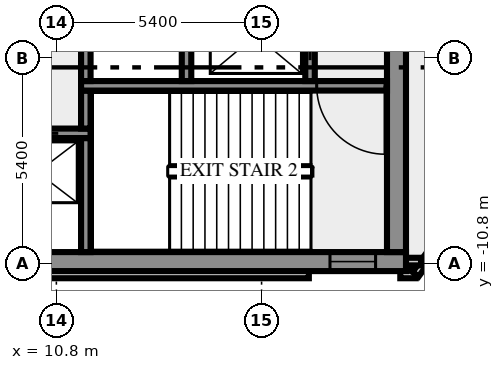
"""IFC4 building model, lengths in metres.
Left out: names, types, materials, properties, quantities, classifications, styles, units other than length and angle.
Written with IfcOpenShell. Run it as: python <this file> out.ifc"""

import sys

from ifc_helpers import new_model, si_unit, direction, frame, frame_2d, origin, place, context, subcontext, project, spatial, rectangle, extrude, element, fill, save


model = new_model("IFC4")
c1 = context("Model", 3, precision=1e-05, world=origin(), true_north=direction((0.0, 1.0)))
c2 = subcontext(c1, "Body", "Model", "MODEL_VIEW")
j1 = project(units=[si_unit("LENGTHUNIT", "METRE"), si_unit("PLANEANGLEUNIT", "RADIAN")], contexts=[c1])
p1 = place(None, origin())
s1 = spatial("IfcSite", under=j1, at=p1, CompositionType="ELEMENT")
p2 = place(p1, origin())
s2 = spatial("IfcBuilding", under=s1, at=p2, CompositionType="ELEMENT")
p3 = place(p2, frame((0.0, 0.0, 210.0)))
s3 = spatial("IfcBuildingStorey", under=s2, at=p3, CompositionType="ELEMENT", Elevation=210.0)
p4 = place(p3, frame((-17.444, -11.088, 0.0), z_axis=(0.0, 0.0, 1.0), x_axis=(1.0, 0.0, 0.0)))
e1 = element("IfcWall", 1, at=p4, inside=s3, PredefinedType="SOLIDWALL", context=c2, shape_type="SweptSolid", body=[
    extrude(rectangle(XDim=34.888, YDim=0.2, at=frame_2d((17.444, 0.0))), origin(), (0.0, 0.0, 1.0), 3.65),
])
p5 = place(p3, frame((19.85, -11.088, 0.0), z_axis=(0.0, 0.0, 1.0), x_axis=(1.0, 0.0, 0.0)))
e2 = element("IfcWall", 2, at=p5, inside=s3, PredefinedType="SOLIDWALL", context=c2, shape_type="SweptSolid", body=[
    extrude(rectangle(XDim=0.406, YDim=0.2, at=frame_2d((0.203, 0.0))), origin(), (0.0, 0.0, 1.0), 3.65),
])
p6 = place(p3, frame((20.253, -11.083, 0.0), z_axis=(0.0, 0.0, 1.0), x_axis=(0.587766567315, 0.809030569476, 0.0)))
e3 = element("IfcWall", 3, at=p6, inside=s3, PredefinedType="SOLIDWALL", context=c2, shape_type="SweptSolid", body=[
    extrude(rectangle(XDim=2.688, YDim=0.2, at=frame_2d((1.344, 0.0))), origin(), (0.0, 0.0, 1.0), 3.65),
])
p7 = place(p3, frame((19.98, -10.75, 0.0), z_axis=(0.0, 0.0, 1.0), x_axis=(1.0, 0.0, 0.0)))
e4 = element("IfcWall", 4, at=p7, inside=s3, PredefinedType="SOLIDWALL", context=c2, shape_type="SweptSolid", body=[
    extrude(rectangle(XDim=0.417, YDim=0.2, at=frame_2d((0.208, 0.0))), origin(), (0.0, 0.0, 1.0), 3.65),
])
p8 = place(p3, frame((-20.0, -10.75, 0.0), z_axis=(0.0, 0.0, 1.0), x_axis=(1.0, 0.0, 0.0)))
e5 = element("IfcWall", 5, at=p8, inside=s3, PredefinedType="SHEAR", context=c2, shape_type="SweptSolid", body=[
    extrude(rectangle(XDim=40.0, YDim=0.5, at=frame_2d((20.0, 0.0))), origin(), (0.0, 0.0, 1.0), 3.65),
])
p9 = place(p8, frame((0.8, 0.0, 1.0)))
e6 = element("IfcOpeningElement", 6, at=p9, cuts=e5, PredefinedType="OPENING", context=c2, shape_type="SweptSolid", body=[
    extrude(rectangle(XDim=1.2, YDim=1.2, at=frame_2d((0.6, 0.6))), frame((0.0, 0.26, 0.0), z_axis=(0.0, -1.0, 0.0), x_axis=(1.0, 0.0, 0.0)), (0.0, 0.0, 1.0), 0.52),
])
p10 = place(p8, frame((38.0, 0.0, 1.0)))
e7 = element("IfcOpeningElement", 7, at=p10, cuts=e5, PredefinedType="OPENING", context=c2, shape_type="SweptSolid", body=[
    extrude(rectangle(XDim=1.2, YDim=1.2, at=frame_2d((0.6, 0.6))), frame((0.0, 0.26, 0.0), z_axis=(0.0, -1.0, 0.0), x_axis=(1.0, 0.0, 0.0)), (0.0, 0.0, 1.0), 0.52),
])
p11 = place(p3, frame((11.575, -10.5, 0.0), z_axis=(0.0, 0.0, 1.0), x_axis=(0.0, 1.0, 0.0)))
e8 = element("IfcWall", 8, at=p11, inside=s3, PredefinedType="SHEAR", context=c2, shape_type="SweptSolid", body=[
    extrude(rectangle(XDim=3.0, YDim=0.25, at=frame_2d((1.5, 0.0))), origin(), (0.0, 0.0, 1.0), 3.65),
])
p12 = place(p3, frame((19.75, -10.5, 0.0), z_axis=(0.0, 0.0, 1.0), x_axis=(0.0, 1.0, 0.0)))
e9 = element("IfcWall", 9, at=p12, inside=s3, PredefinedType="SHEAR", context=c2, shape_type="SweptSolid", body=[
    extrude(rectangle(XDim=8.8, YDim=0.5, at=frame_2d((4.4, 0.0))), origin(), (0.0, 0.0, 1.0), 3.65),
])
p13 = place(p3, frame((11.7, -7.375, 0.0), z_axis=(0.0, 0.0, 1.0), x_axis=(-1.0, 0.0, 0.0)))
e10 = element("IfcWall", 10, at=p13, inside=s3, PredefinedType="SHEAR", context=c2, shape_type="SweptSolid", body=[
    extrude(rectangle(XDim=23.4, YDim=0.25, at=frame_2d((11.7, 0.0))), origin(), (0.0, 0.0, 1.0), 3.65),
])
p14 = place(p13, frame((21.312, 0.0, 0.0)))
e11 = element("IfcOpeningElement", 11, at=p14, cuts=e10, PredefinedType="OPENING", context=c2, shape_type="SweptSolid", body=[
    extrude(rectangle(XDim=0.9, YDim=2.1, at=frame_2d((0.45, 1.05))), frame((0.0, 0.135, 0.0), z_axis=(0.0, -1.0, 0.0), x_axis=(1.0, 0.0, 0.0)), (0.0, 0.0, 1.0), 0.27),
])
p15 = place(p13, frame((18.65, 0.0, 0.0)))
e12 = element("IfcOpeningElement", 12, at=p15, cuts=e10, PredefinedType="OPENING", context=c2, shape_type="SweptSolid", body=[
    extrude(rectangle(XDim=0.9, YDim=2.1, at=frame_2d((0.45, 1.05))), frame((0.0, 0.135, 0.0), z_axis=(0.0, -1.0, 0.0), x_axis=(1.0, 0.0, 0.0)), (0.0, 0.0, 1.0), 0.27),
])
p16 = place(p13, frame((16.388, 0.0, 0.0)))
e13 = element("IfcOpeningElement", 13, at=p16, cuts=e10, PredefinedType="OPENING", context=c2, shape_type="SweptSolid", body=[
    extrude(rectangle(XDim=0.9, YDim=2.1, at=frame_2d((0.45, 1.05))), frame((0.0, 0.135, 0.0), z_axis=(0.0, -1.0, 0.0), x_axis=(1.0, 0.0, 0.0)), (0.0, 0.0, 1.0), 0.27),
])
p17 = place(p13, frame((14.65, 0.0, 0.0)))
e14 = element("IfcOpeningElement", 14, at=p17, cuts=e10, PredefinedType="OPENING", context=c2, shape_type="SweptSolid", body=[
    extrude(rectangle(XDim=0.7, YDim=2.1, at=frame_2d((0.35, 1.05))), frame((0.0, 0.135, 0.0), z_axis=(0.0, -1.0, 0.0), x_axis=(1.0, 0.0, 0.0)), (0.0, 0.0, 1.0), 0.27),
])
p18 = place(p13, frame((13.35, 0.0, 0.0)))
e15 = element("IfcOpeningElement", 15, at=p18, cuts=e10, PredefinedType="OPENING", context=c2, shape_type="SweptSolid", body=[
    extrude(rectangle(XDim=0.9, YDim=2.1, at=frame_2d((0.45, 1.05))), frame((0.0, 0.135, 0.0), z_axis=(0.0, -1.0, 0.0), x_axis=(1.0, 0.0, 0.0)), (0.0, 0.0, 1.0), 0.27),
])
p19 = place(p13, frame((11.975, 0.0, 0.0)))
e16 = element("IfcOpeningElement", 16, at=p19, cuts=e10, PredefinedType="OPENING", context=c2, shape_type="SweptSolid", body=[
    extrude(rectangle(XDim=0.9, YDim=2.1, at=frame_2d((0.45, 1.05))), frame((0.0, 0.135, 0.0), z_axis=(0.0, -1.0, 0.0), x_axis=(1.0, 0.0, 0.0)), (0.0, 0.0, 1.0), 0.27),
])
p20 = place(p13, frame((10.5, 0.0, 0.0)))
e17 = element("IfcOpeningElement", 17, at=p20, cuts=e10, PredefinedType="OPENING", context=c2, shape_type="SweptSolid", body=[
    extrude(rectangle(XDim=0.9, YDim=2.1, at=frame_2d((0.45, 1.05))), frame((0.0, 0.135, 0.0), z_axis=(0.0, -1.0, 0.0), x_axis=(1.0, 0.0, 0.0)), (0.0, 0.0, 1.0), 0.27),
])
p21 = place(p13, frame((8.35, 0.0, 0.0)))
e18 = element("IfcOpeningElement", 18, at=p21, cuts=e10, PredefinedType="OPENING", context=c2, shape_type="SweptSolid", body=[
    extrude(rectangle(XDim=1.1, YDim=2.1, at=frame_2d((0.55, 1.05))), frame((0.0, 0.135, 0.0), z_axis=(0.0, -1.0, 0.0), x_axis=(1.0, 0.0, 0.0)), (0.0, 0.0, 1.0), 0.27),
])
p22 = place(p13, frame((5.85, 0.0, 0.0)))
e19 = element("IfcOpeningElement", 19, at=p22, cuts=e10, PredefinedType="OPENING", context=c2, shape_type="SweptSolid", body=[
    extrude(rectangle(XDim=1.1, YDim=2.1, at=frame_2d((0.55, 1.05))), frame((0.0, 0.135, 0.0), z_axis=(0.0, -1.0, 0.0), x_axis=(1.0, 0.0, 0.0)), (0.0, 0.0, 1.0), 0.27),
])
p23 = place(p13, frame((3.35, 0.0, 0.0)))
e20 = element("IfcOpeningElement", 20, at=p23, cuts=e10, PredefinedType="OPENING", context=c2, shape_type="SweptSolid", body=[
    extrude(rectangle(XDim=1.1, YDim=2.1, at=frame_2d((0.55, 1.05))), frame((0.0, 0.135, 0.0), z_axis=(0.0, -1.0, 0.0), x_axis=(1.0, 0.0, 0.0)), (0.0, 0.0, 1.0), 0.27),
])
p24 = place(p13, frame((0.85, 0.0, 0.0)))
e21 = element("IfcOpeningElement", 21, at=p24, cuts=e10, PredefinedType="OPENING", context=c2, shape_type="SweptSolid", body=[
    extrude(rectangle(XDim=1.1, YDim=2.1, at=frame_2d((0.55, 1.05))), frame((0.0, 0.135, 0.0), z_axis=(0.0, -1.0, 0.0), x_axis=(1.0, 0.0, 0.0)), (0.0, 0.0, 1.0), 0.27),
])
p25 = place(p3, frame((11.575, -7.25, 0.0), z_axis=(0.0, 0.0, 1.0), x_axis=(0.0, 1.0, 0.0)))
e22 = element("IfcWall", 22, at=p25, inside=s3, PredefinedType="SHEAR", context=c2, shape_type="SweptSolid", body=[
    extrude(rectangle(XDim=1.0, YDim=0.25, at=frame_2d((0.5, 0.0))), origin(), (0.0, 0.0, 1.0), 3.65),
])
p26 = place(p3, frame((19.5, -6.125, 0.0), z_axis=(0.0, 0.0, 1.0), x_axis=(-1.0, 0.0, 0.0)))
e23 = element("IfcWall", 23, at=p26, inside=s3, PredefinedType="SHEAR", context=c2, shape_type="SweptSolid", body=[
    extrude(rectangle(XDim=8.05, YDim=0.25, at=frame_2d((4.025, 0.0))), origin(), (0.0, 0.0, 1.0), 3.65),
])
p27 = place(p26, frame((0.05, 0.0, 0.0)))
e24 = element("IfcOpeningElement", 24, at=p27, cuts=e23, PredefinedType="OPENING", context=c2, shape_type="SweptSolid", body=[
    extrude(rectangle(XDim=1.8, YDim=2.1, at=frame_2d((0.9, 1.05))), frame((0.0, 0.135, 0.0), z_axis=(0.0, -1.0, 0.0), x_axis=(1.0, 0.0, 0.0)), (0.0, 0.0, 1.0), 0.27),
])
p28 = place(p3, frame((11.575, -6.0, 0.0), z_axis=(0.0, 0.0, 1.0), x_axis=(0.0, 1.0, 0.0)))
e25 = element("IfcWall", 25, at=p28, inside=s3, PredefinedType="SHEAR", context=c2, shape_type="SweptSolid", body=[
    extrude(rectangle(XDim=1.75, YDim=0.25, at=frame_2d((0.875, 0.0))), origin(), (0.0, 0.0, 1.0), 3.65),
])
p29 = place(p3, frame((14.225, -6.0, 0.0), z_axis=(0.0, 0.0, 1.0), x_axis=(0.0, 1.0, 0.0)))
e26 = element("IfcWall", 26, at=p29, inside=s3, PredefinedType="SHEAR", context=c2, shape_type="SweptSolid", body=[
    extrude(rectangle(XDim=4.3, YDim=0.25, at=frame_2d((2.15, 0.0))), origin(), (0.0, 0.0, 1.0), 3.65),
])
p30 = place(p3, frame((17.475, -6.0, 0.0), z_axis=(0.0, 0.0, 1.0), x_axis=(0.0, 1.0, 0.0)))
e27 = element("IfcWall", 27, at=p30, inside=s3, PredefinedType="SHEAR", context=c2, shape_type="SweptSolid", body=[
    extrude(rectangle(XDim=4.3, YDim=0.25, at=frame_2d((2.15, 0.0))), origin(), (0.0, 0.0, 1.0), 3.65),
])
p31 = place(p30, frame((0.55, 0.0, 0.0)))
e28 = element("IfcOpeningElement", 28, at=p31, cuts=e27, PredefinedType="OPENING", context=c2, shape_type="SweptSolid", body=[
    extrude(rectangle(XDim=1.3, YDim=2.1, at=frame_2d((0.65, 1.05))), frame((0.0, 0.135, 0.0), z_axis=(0.0, -1.0, 0.0), x_axis=(1.0, 0.0, 0.0)), (0.0, 0.0, 1.0), 0.27),
])
p32 = place(p10, origin())
e29 = element("IfcWindow", 29, at=p32, inside=s3, PartitioningType="SINGLE_PANEL", PredefinedType="WINDOW", context=c2, shape_type="SweptSolid", body=[
    extrude(rectangle(XDim=1.2, YDim=1.2, at=frame_2d((0.6, 0.6))), frame((0.0, 0.03, 0.0), z_axis=(0.0, -1.0, 0.0), x_axis=(1.0, 0.0, 0.0)), (0.0, 0.0, 1.0), 0.06),
])
fill(e7, e29)
p33 = place(p24, origin())
e30 = element("IfcDoor", 30, at=p33, inside=s3, OperationType="DOUBLE_DOOR_SLIDING", PredefinedType="DOOR", context=c2, shape_type="SweptSolid", body=[
    extrude(rectangle(XDim=1.1, YDim=2.1, at=frame_2d((0.55, 1.05))), frame((0.0, 0.025, 0.0), z_axis=(0.0, -1.0, 0.0), x_axis=(1.0, 0.0, 0.0)), (0.0, 0.0, 1.0), 0.05),
])
fill(e21, e30)
p34 = place(p27, origin())
e31 = element("IfcDoor", 31, at=p34, inside=s3, OperationType="DOUBLE_DOOR_SINGLE_SWING", PredefinedType="DOOR", context=c2, shape_type="SweptSolid", body=[
    extrude(rectangle(XDim=1.8, YDim=2.1, at=frame_2d((0.9, 1.05))), frame((0.0, 0.025, 0.0), z_axis=(0.0, -1.0, 0.0), x_axis=(1.0, 0.0, 0.0)), (0.0, 0.0, 1.0), 0.05),
])
fill(e24, e31)
p35 = place(p31, origin())
e32 = element("IfcDoor", 32, at=p35, inside=s3, OperationType="DOUBLE_DOOR_SLIDING", PredefinedType="DOOR", context=c2, shape_type="SweptSolid", body=[
    extrude(rectangle(XDim=1.3, YDim=2.1, at=frame_2d((0.65, 1.05))), frame((0.0, 0.025, 0.0), z_axis=(0.0, -1.0, 0.0), x_axis=(1.0, 0.0, 0.0)), (0.0, 0.0, 1.0), 0.05),
])
fill(e28, e32)
save(model, sys.argv[1])
